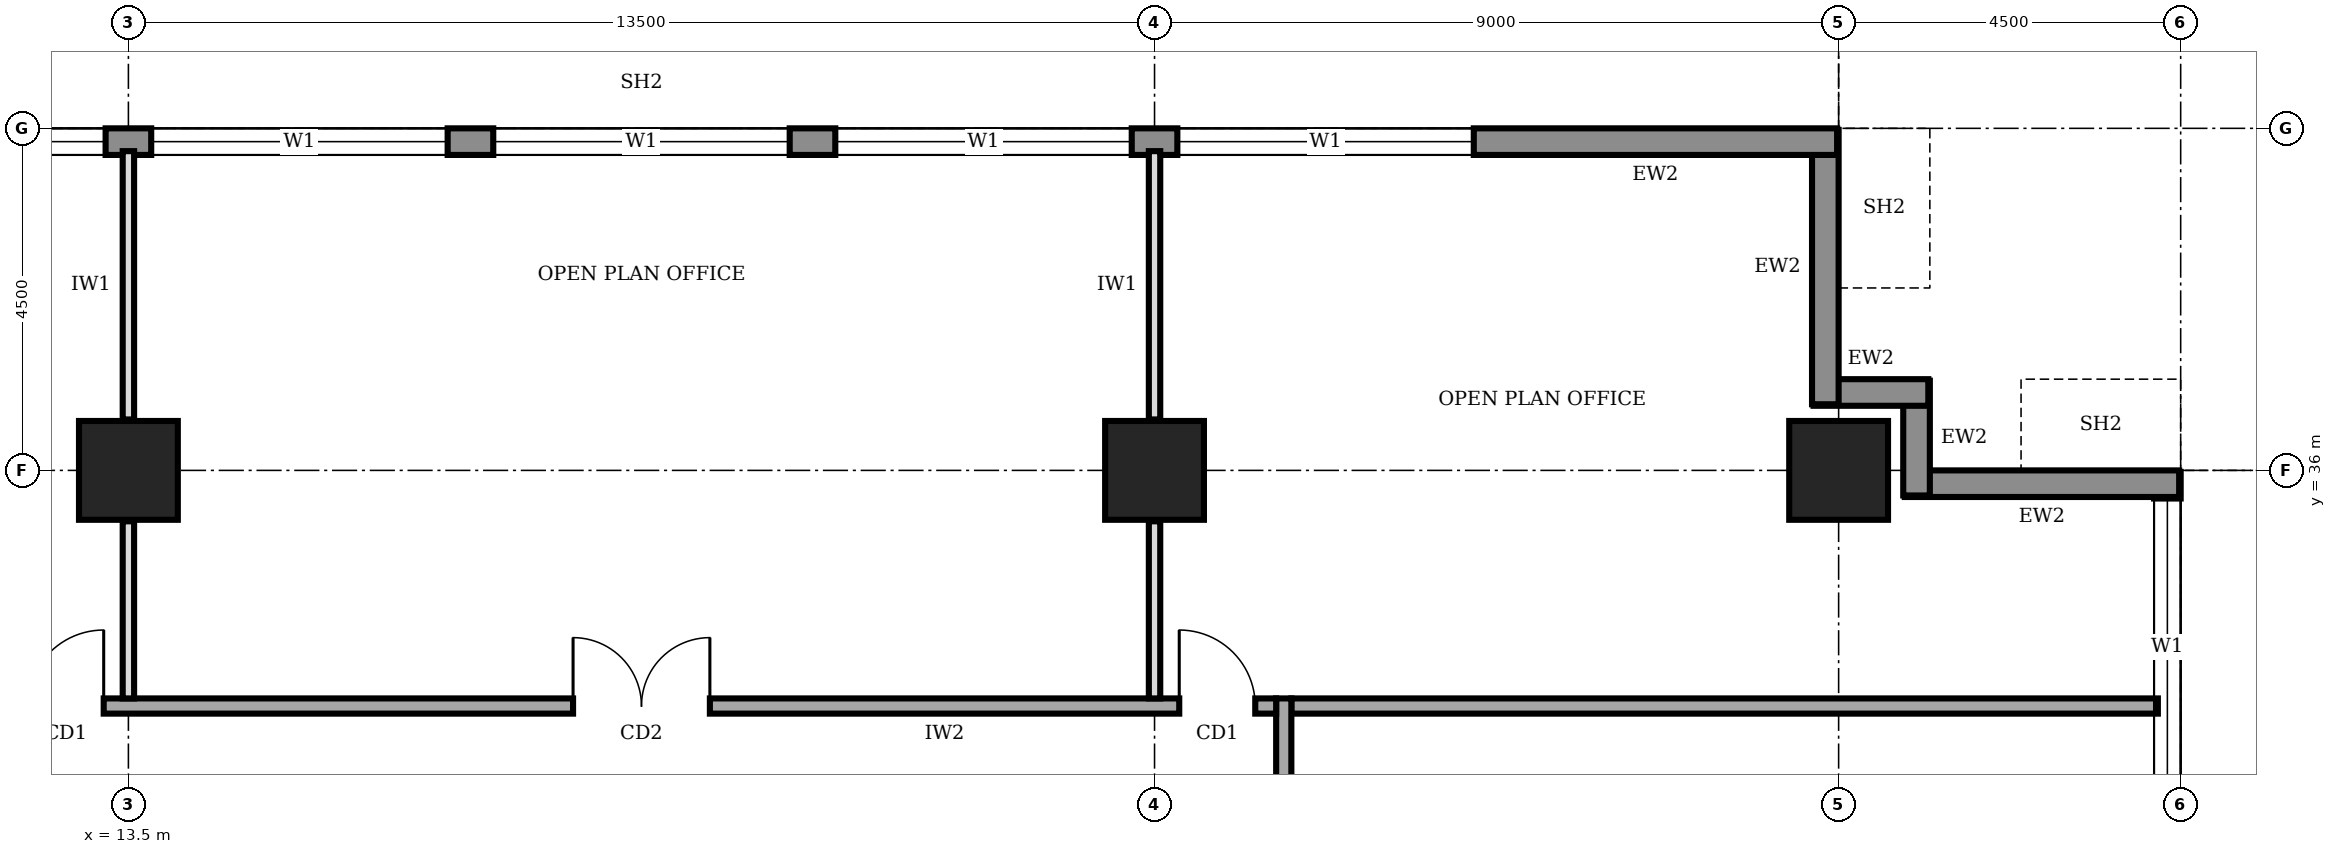
"""IFC4 building model, lengths in metres.
Left out: names, types, materials, properties, quantities, classifications, styles, units other than length and angle.
Written with IfcOpenShell. Run it as: python <this file> out.ifc"""

import sys

from ifc_helpers import new_model, si_unit, direction, frame, frame_2d, origin, origin_2d, place, context, subcontext, project, spatial, rectangle, extrude, element, fill, save


model = new_model("IFC4")
c1 = context("Model", 3, precision=1e-05, world=origin(), true_north=direction((0.0, 1.0)))
c2 = subcontext(c1, "Body", "Model", "MODEL_VIEW")
j1 = project(units=[si_unit("LENGTHUNIT", "METRE"), si_unit("PLANEANGLEUNIT", "RADIAN")], contexts=[c1])
p1 = place(None, origin())
s1 = spatial("IfcSite", under=j1, at=p1, CompositionType="ELEMENT")
p2 = place(p1, origin())
s2 = spatial("IfcBuilding", under=s1, at=p2, CompositionType="ELEMENT")
p3 = place(p2, frame((0.0, 0.0, 273.0)))
s3 = spatial("IfcBuildingStorey", under=s2, at=p3, CompositionType="ELEMENT", Elevation=273.0)
for number, where, z_axis, x_axis in (
    (1, (13.5, 36.0, 0.0), (0.0, 0.0, 1.0), (1.0, 0.0, 0.0)),
    (2, (27.0, 36.0, 0.0), (0.0, 0.0, 1.0), (1.0, 0.0, 0.0)),
    (3, (36.0, 36.0, 0.0), (0.0, 0.0, 1.0), (1.0, 0.0, 0.0)),
):
    element("IfcColumn", number, at=place(p3, frame(where, z_axis=z_axis, x_axis=x_axis)), inside=s3, PredefinedType="COLUMN", context=c2, shape_type="SweptSolid", body=[
        extrude(rectangle(XDim=1.3, YDim=1.3, at=origin_2d()), origin(), (0.0, 0.0, 1.0), 4.0),
    ])
p4 = place(p3, frame((40.325, 4.52, 0.0), z_axis=(0.0, 0.0, 1.0), x_axis=(0.0, 1.0, 0.0)))
e4 = element("IfcWall", 4, at=p4, inside=s3, PredefinedType="STANDARD", context=c2, shape_type="SweptSolid", body=[
    extrude(rectangle(XDim=31.46, YDim=0.35, at=frame_2d((15.73, 0.0))), origin(), (0.0, 0.0, 1.0), 3.75),
])
p5 = place(p4, frame((4.78, 0.0, 0.9)))
e5 = element("IfcOpeningElement", 5, at=p5, cuts=e4, PredefinedType="OPENING", context=c2, shape_type="SweptSolid", body=[
    extrude(rectangle(XDim=3.9, YDim=2.2, at=frame_2d((1.95, 1.1))), frame((0.0, 0.185, 0.0), z_axis=(0.0, -1.0, 0.0), x_axis=(1.0, 0.0, 0.0)), (0.0, 0.0, 1.0), 0.37),
])
p6 = place(p4, frame((9.28, 0.0, 0.9)))
e6 = element("IfcOpeningElement", 6, at=p6, cuts=e4, PredefinedType="OPENING", context=c2, shape_type="SweptSolid", body=[
    extrude(rectangle(XDim=3.9, YDim=2.2, at=frame_2d((1.95, 1.1))), frame((0.0, 0.185, 0.0), z_axis=(0.0, -1.0, 0.0), x_axis=(1.0, 0.0, 0.0)), (0.0, 0.0, 1.0), 0.37),
])
p7 = place(p4, frame((13.78, 0.0, 0.9)))
e7 = element("IfcOpeningElement", 7, at=p7, cuts=e4, PredefinedType="OPENING", context=c2, shape_type="SweptSolid", body=[
    extrude(rectangle(XDim=3.9, YDim=2.2, at=frame_2d((1.95, 1.1))), frame((0.0, 0.185, 0.0), z_axis=(0.0, -1.0, 0.0), x_axis=(1.0, 0.0, 0.0)), (0.0, 0.0, 1.0), 0.37),
])
p8 = place(p4, frame((18.28, 0.0, 0.9)))
e8 = element("IfcOpeningElement", 8, at=p8, cuts=e4, PredefinedType="OPENING", context=c2, shape_type="SweptSolid", body=[
    extrude(rectangle(XDim=3.9, YDim=2.2, at=frame_2d((1.95, 1.1))), frame((0.0, 0.185, 0.0), z_axis=(0.0, -1.0, 0.0), x_axis=(1.0, 0.0, 0.0)), (0.0, 0.0, 1.0), 0.37),
])
p9 = place(p4, frame((22.78, 0.0, 0.9)))
e9 = element("IfcOpeningElement", 9, at=p9, cuts=e4, PredefinedType="OPENING", context=c2, shape_type="SweptSolid", body=[
    extrude(rectangle(XDim=3.9, YDim=2.2, at=frame_2d((1.95, 1.1))), frame((0.0, 0.185, 0.0), z_axis=(0.0, -1.0, 0.0), x_axis=(1.0, 0.0, 0.0)), (0.0, 0.0, 1.0), 0.37),
])
p10 = place(p4, frame((27.21, 0.0, 0.9)))
e10 = element("IfcOpeningElement", 10, at=p10, cuts=e4, PredefinedType="OPENING", context=c2, shape_type="SweptSolid", body=[
    extrude(rectangle(XDim=3.9, YDim=2.2, at=frame_2d((1.95, 1.1))), frame((0.0, 0.185, 0.0), z_axis=(0.0, -1.0, 0.0), x_axis=(1.0, 0.0, 0.0)), (0.0, 0.0, 1.0), 0.37),
])
p11 = place(p3, frame((40.48, 35.825, 0.0), z_axis=(0.0, 0.0, 1.0), x_axis=(-1.0, 0.0, 0.0)))
e11 = element("IfcWall", 11, at=p11, inside=s3, PredefinedType="STANDARD", context=c2, shape_type="SweptSolid", body=[
    extrude(rectangle(XDim=3.61, YDim=0.35, at=frame_2d((1.805, 0.0))), origin(), (0.0, 0.0, 1.0), 2.85),
])
for number, where, z_axis, x_axis in (
    (12, (37.025, 35.67, 0.0), (0.0, 0.0, 1.0), (0.0, 1.0, 0.0)),
    (13, (37.18, 37.025, 0.0), (0.0, 0.0, 1.0), (-1.0, 0.0, 0.0)),
):
    element("IfcWall", number, at=place(p3, frame(where, z_axis=z_axis, x_axis=x_axis)), inside=s3, PredefinedType="STANDARD", context=c2, shape_type="SweptSolid", body=[
        extrude(rectangle(XDim=1.51, YDim=0.35, at=frame_2d((0.755, 0.0))), origin(), (0.0, 0.0, 1.0), 3.75),
    ])
p12 = place(p3, frame((35.825, 36.87, 0.0), z_axis=(0.0, 0.0, 1.0), x_axis=(0.0, 1.0, 0.0)))
e14 = element("IfcWall", 14, at=p12, inside=s3, PredefinedType="STANDARD", context=c2, shape_type="SweptSolid", body=[
    extrude(rectangle(XDim=3.61, YDim=0.35, at=frame_2d((1.805, 0.0))), origin(), (0.0, 0.0, 1.0), 2.85),
])
p13 = place(p3, frame((35.98, 40.325, 0.0), z_axis=(0.0, 0.0, 1.0), x_axis=(-1.0, 0.0, 0.0)))
e15 = element("IfcWall", 15, at=p13, inside=s3, PredefinedType="STANDARD", context=c2, shape_type="SweptSolid", body=[
    extrude(rectangle(XDim=31.46, YDim=0.35, at=frame_2d((15.73, 0.0))), origin(), (0.0, 0.0, 1.0), 3.75),
])
p14 = place(p13, frame((27.21, 0.0, 0.9)))
e16 = element("IfcOpeningElement", 16, at=p14, cuts=e15, PredefinedType="OPENING", context=c2, shape_type="SweptSolid", body=[
    extrude(rectangle(XDim=3.9, YDim=2.2, at=frame_2d((1.95, 1.1))), frame((0.0, 0.185, 0.0), z_axis=(0.0, -1.0, 0.0), x_axis=(1.0, 0.0, 0.0)), (0.0, 0.0, 1.0), 0.37),
])
p15 = place(p13, frame((22.78, 0.0, 0.9)))
e17 = element("IfcOpeningElement", 17, at=p15, cuts=e15, PredefinedType="OPENING", context=c2, shape_type="SweptSolid", body=[
    extrude(rectangle(XDim=3.9, YDim=2.2, at=frame_2d((1.95, 1.1))), frame((0.0, 0.185, 0.0), z_axis=(0.0, -1.0, 0.0), x_axis=(1.0, 0.0, 0.0)), (0.0, 0.0, 1.0), 0.37),
])
p16 = place(p13, frame((18.28, 0.0, 0.9)))
e18 = element("IfcOpeningElement", 18, at=p16, cuts=e15, PredefinedType="OPENING", context=c2, shape_type="SweptSolid", body=[
    extrude(rectangle(XDim=3.9, YDim=2.2, at=frame_2d((1.95, 1.1))), frame((0.0, 0.185, 0.0), z_axis=(0.0, -1.0, 0.0), x_axis=(1.0, 0.0, 0.0)), (0.0, 0.0, 1.0), 0.37),
])
p17 = place(p13, frame((13.78, 0.0, 0.9)))
e19 = element("IfcOpeningElement", 19, at=p17, cuts=e15, PredefinedType="OPENING", context=c2, shape_type="SweptSolid", body=[
    extrude(rectangle(XDim=3.9, YDim=2.2, at=frame_2d((1.95, 1.1))), frame((0.0, 0.185, 0.0), z_axis=(0.0, -1.0, 0.0), x_axis=(1.0, 0.0, 0.0)), (0.0, 0.0, 1.0), 0.37),
])
p18 = place(p13, frame((9.28, 0.0, 0.9)))
e20 = element("IfcOpeningElement", 20, at=p18, cuts=e15, PredefinedType="OPENING", context=c2, shape_type="SweptSolid", body=[
    extrude(rectangle(XDim=3.9, YDim=2.2, at=frame_2d((1.95, 1.1))), frame((0.0, 0.185, 0.0), z_axis=(0.0, -1.0, 0.0), x_axis=(1.0, 0.0, 0.0)), (0.0, 0.0, 1.0), 0.37),
])
p19 = place(p13, frame((4.78, 0.0, 0.9)))
e21 = element("IfcOpeningElement", 21, at=p19, cuts=e15, PredefinedType="OPENING", context=c2, shape_type="SweptSolid", body=[
    extrude(rectangle(XDim=3.9, YDim=2.2, at=frame_2d((1.95, 1.1))), frame((0.0, 0.185, 0.0), z_axis=(0.0, -1.0, 0.0), x_axis=(1.0, 0.0, 0.0)), (0.0, 0.0, 1.0), 0.37),
])
p20 = place(p3, frame((28.7, 9.2, 0.0), z_axis=(0.0, 0.0, 1.0), x_axis=(0.0, 1.0, 0.0)))
e22 = element("IfcWall", 22, at=p20, inside=s3, PredefinedType="SOLIDWALL", context=c2, shape_type="SweptSolid", body=[
    extrude(rectangle(XDim=23.8, YDim=0.2, at=frame_2d((11.9, 0.0))), origin(), (0.0, 0.0, 1.0), 3.75),
])
p21 = place(p20, frame((3.4, 0.0, 0.0)))
e23 = element("IfcOpeningElement", 23, at=p21, cuts=e22, PredefinedType="OPENING", context=c2, shape_type="SweptSolid", body=[
    extrude(rectangle(XDim=1.8, YDim=2.1, at=frame_2d((0.9, 1.05))), frame((0.0, 0.11, 0.0), z_axis=(0.0, -1.0, 0.0), x_axis=(1.0, 0.0, 0.0)), (0.0, 0.0, 1.0), 0.22),
])
p22 = place(p20, frame((10.55, 0.0, 0.0)))
e24 = element("IfcOpeningElement", 24, at=p22, cuts=e22, PredefinedType="OPENING", context=c2, shape_type="SweptSolid", body=[
    extrude(rectangle(XDim=1.0, YDim=2.1, at=frame_2d((0.5, 1.05))), frame((0.0, 0.11, 0.0), z_axis=(0.0, -1.0, 0.0), x_axis=(1.0, 0.0, 0.0)), (0.0, 0.0, 1.0), 0.22),
])
p23 = place(p20, frame((17.65, 0.0, 0.0)))
e25 = element("IfcOpeningElement", 25, at=p23, cuts=e22, PredefinedType="OPENING", context=c2, shape_type="SweptSolid", body=[
    extrude(rectangle(XDim=1.8, YDim=2.1, at=frame_2d((0.9, 1.05))), frame((0.0, 0.11, 0.0), z_axis=(0.0, -1.0, 0.0), x_axis=(1.0, 0.0, 0.0)), (0.0, 0.0, 1.0), 0.22),
])
p24 = place(p3, frame((28.6, 32.9, 0.0), z_axis=(0.0, 0.0, 1.0), x_axis=(-1.0, 0.0, 0.0)))
e26 = element("IfcWall", 26, at=p24, inside=s3, PredefinedType="SOLIDWALL", context=c2, shape_type="SweptSolid", body=[
    extrude(rectangle(XDim=16.9, YDim=0.2, at=frame_2d((8.45, 0.0))), origin(), (0.0, 0.0, 1.0), 3.75),
])
p25 = place(p24, frame((15.425, 0.0, 0.0)))
e27 = element("IfcOpeningElement", 27, at=p25, cuts=e26, PredefinedType="OPENING", context=c2, shape_type="SweptSolid", body=[
    extrude(rectangle(XDim=1.0, YDim=2.1, at=frame_2d((0.5, 1.05))), frame((0.0, 0.11, 0.0), z_axis=(0.0, -1.0, 0.0), x_axis=(1.0, 0.0, 0.0)), (0.0, 0.0, 1.0), 0.22),
])
p26 = place(p24, frame((7.45, 0.0, 0.0)))
e28 = element("IfcOpeningElement", 28, at=p26, cuts=e26, PredefinedType="OPENING", context=c2, shape_type="SweptSolid", body=[
    extrude(rectangle(XDim=1.8, YDim=2.1, at=frame_2d((0.9, 1.05))), frame((0.0, 0.11, 0.0), z_axis=(0.0, -1.0, 0.0), x_axis=(1.0, 0.0, 0.0)), (0.0, 0.0, 1.0), 0.22),
])
p27 = place(p24, frame((0.275, 0.0, 0.0)))
e29 = element("IfcOpeningElement", 29, at=p27, cuts=e26, PredefinedType="OPENING", context=c2, shape_type="SweptSolid", body=[
    extrude(rectangle(XDim=1.0, YDim=2.1, at=frame_2d((0.5, 1.05))), frame((0.0, 0.11, 0.0), z_axis=(0.0, -1.0, 0.0), x_axis=(1.0, 0.0, 0.0)), (0.0, 0.0, 1.0), 0.22),
])
p28 = place(p3, frame((28.8, 32.9, 0.0), z_axis=(0.0, 0.0, 1.0), x_axis=(1.0, 0.0, 0.0)))
e30 = element("IfcWall", 30, at=p28, inside=s3, PredefinedType="SOLIDWALL", context=c2, shape_type="SweptSolid", body=[
    extrude(rectangle(XDim=11.4, YDim=0.2, at=frame_2d((5.7, 0.0))), origin(), (0.0, 0.0, 1.0), 3.75),
])
p29 = place(p3, frame((13.5, 33.0, 0.0), z_axis=(0.0, 0.0, 1.0), x_axis=(0.0, 1.0, 0.0)))
e31 = element("IfcWall", 31, at=p29, inside=s3, PredefinedType="PARTITIONING", context=c2, shape_type="SweptSolid", body=[
    extrude(rectangle(XDim=2.33, YDim=0.15, at=frame_2d((1.165, 0.0))), origin(), (0.0, 0.0, 1.0), 2.85),
])
p30 = place(p3, frame((13.5, 36.67, 0.0), z_axis=(0.0, 0.0, 1.0), x_axis=(0.0, 1.0, 0.0)))
e32 = element("IfcWall", 32, at=p30, inside=s3, PredefinedType="PARTITIONING", context=c2, shape_type="SweptSolid", body=[
    extrude(rectangle(XDim=3.53, YDim=0.15, at=frame_2d((1.765, 0.0))), origin(), (0.0, 0.0, 1.0), 2.85),
])
p31 = place(p3, frame((27.0, 33.0, 0.0), z_axis=(0.0, 0.0, 1.0), x_axis=(0.0, 1.0, 0.0)))
e33 = element("IfcWall", 33, at=p31, inside=s3, PredefinedType="PARTITIONING", context=c2, shape_type="SweptSolid", body=[
    extrude(rectangle(XDim=2.33, YDim=0.15, at=frame_2d((1.165, 0.0))), origin(), (0.0, 0.0, 1.0), 2.85),
])
p32 = place(p3, frame((27.0, 36.67, 0.0), z_axis=(0.0, 0.0, 1.0), x_axis=(0.0, 1.0, 0.0)))
e34 = element("IfcWall", 34, at=p32, inside=s3, PredefinedType="PARTITIONING", context=c2, shape_type="SweptSolid", body=[
    extrude(rectangle(XDim=3.53, YDim=0.15, at=frame_2d((1.765, 0.0))), origin(), (0.0, 0.0, 1.0), 2.85),
])
p33 = place(p10, origin())
e35 = element("IfcWindow", 35, at=p33, inside=s3, PartitioningType="SINGLE_PANEL", PredefinedType="WINDOW", context=c2, shape_type="SweptSolid", body=[
    extrude(rectangle(XDim=3.9, YDim=2.2, at=frame_2d((1.95, 1.1))), frame((0.0, 0.03, 0.0), z_axis=(0.0, -1.0, 0.0), x_axis=(1.0, 0.0, 0.0)), (0.0, 0.0, 1.0), 0.06),
])
fill(e10, e35)
p34 = place(p15, origin())
e36 = element("IfcWindow", 36, at=p34, inside=s3, PartitioningType="SINGLE_PANEL", PredefinedType="WINDOW", context=c2, shape_type="SweptSolid", body=[
    extrude(rectangle(XDim=3.9, YDim=2.2, at=frame_2d((1.95, 1.1))), frame((0.0, 0.03, 0.0), z_axis=(0.0, -1.0, 0.0), x_axis=(1.0, 0.0, 0.0)), (0.0, 0.0, 1.0), 0.06),
])
fill(e17, e36)
p35 = place(p16, origin())
e37 = element("IfcWindow", 37, at=p35, inside=s3, PartitioningType="SINGLE_PANEL", PredefinedType="WINDOW", context=c2, shape_type="SweptSolid", body=[
    extrude(rectangle(XDim=3.9, YDim=2.2, at=frame_2d((1.95, 1.1))), frame((0.0, 0.03, 0.0), z_axis=(0.0, -1.0, 0.0), x_axis=(1.0, 0.0, 0.0)), (0.0, 0.0, 1.0), 0.06),
])
fill(e18, e37)
p36 = place(p17, origin())
e38 = element("IfcWindow", 38, at=p36, inside=s3, PartitioningType="SINGLE_PANEL", PredefinedType="WINDOW", context=c2, shape_type="SweptSolid", body=[
    extrude(rectangle(XDim=3.9, YDim=2.2, at=frame_2d((1.95, 1.1))), frame((0.0, 0.03, 0.0), z_axis=(0.0, -1.0, 0.0), x_axis=(1.0, 0.0, 0.0)), (0.0, 0.0, 1.0), 0.06),
])
fill(e19, e38)
p37 = place(p18, origin())
e39 = element("IfcWindow", 39, at=p37, inside=s3, PartitioningType="SINGLE_PANEL", PredefinedType="WINDOW", context=c2, shape_type="SweptSolid", body=[
    extrude(rectangle(XDim=3.9, YDim=2.2, at=frame_2d((1.95, 1.1))), frame((0.0, 0.03, 0.0), z_axis=(0.0, -1.0, 0.0), x_axis=(1.0, 0.0, 0.0)), (0.0, 0.0, 1.0), 0.06),
])
fill(e20, e39)
p38 = place(p19, origin())
e40 = element("IfcWindow", 40, at=p38, inside=s3, PartitioningType="SINGLE_PANEL", PredefinedType="WINDOW", context=c2, shape_type="SweptSolid", body=[
    extrude(rectangle(XDim=3.9, YDim=2.2, at=frame_2d((1.95, 1.1))), frame((0.0, 0.03, 0.0), z_axis=(0.0, -1.0, 0.0), x_axis=(1.0, 0.0, 0.0)), (0.0, 0.0, 1.0), 0.06),
])
fill(e21, e40)
p39 = place(p25, frame((1.0, 0.0, 0.0), z_axis=(0.0, 0.0, 1.0), x_axis=(-1.0, 0.0, 0.0)))
e41 = element("IfcDoor", 41, at=p39, inside=s3, OperationType="SINGLE_SWING_RIGHT", PredefinedType="DOOR", context=c2, shape_type="SweptSolid", body=[
    extrude(rectangle(XDim=1.0, YDim=2.1, at=frame_2d((0.5, 1.05))), frame((0.0, 0.025, 0.0), z_axis=(0.0, -1.0, 0.0), x_axis=(1.0, 0.0, 0.0)), (0.0, 0.0, 1.0), 0.05),
])
fill(e27, e41)
p40 = place(p26, frame((1.8, 0.0, 0.0), z_axis=(0.0, 0.0, 1.0), x_axis=(-1.0, 0.0, 0.0)))
e42 = element("IfcDoor", 42, at=p40, inside=s3, OperationType="DOUBLE_DOOR_SINGLE_SWING", PredefinedType="DOOR", context=c2, shape_type="SweptSolid", body=[
    extrude(rectangle(XDim=1.8, YDim=2.1, at=frame_2d((0.9, 1.05))), frame((0.0, 0.025, 0.0), z_axis=(0.0, -1.0, 0.0), x_axis=(1.0, 0.0, 0.0)), (0.0, 0.0, 1.0), 0.05),
])
fill(e28, e42)
p41 = place(p27, frame((1.0, 0.0, 0.0), z_axis=(0.0, 0.0, 1.0), x_axis=(-1.0, 0.0, 0.0)))
e43 = element("IfcDoor", 43, at=p41, inside=s3, OperationType="SINGLE_SWING_LEFT", PredefinedType="DOOR", context=c2, shape_type="SweptSolid", body=[
    extrude(rectangle(XDim=1.0, YDim=2.1, at=frame_2d((0.5, 1.05))), frame((0.0, 0.025, 0.0), z_axis=(0.0, -1.0, 0.0), x_axis=(1.0, 0.0, 0.0)), (0.0, 0.0, 1.0), 0.05),
])
fill(e29, e43)
save(model, sys.argv[1])
